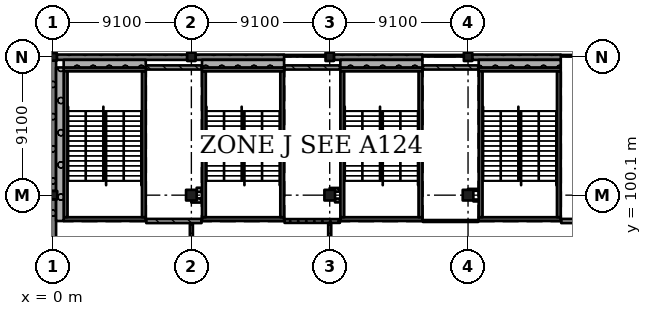
"""IFC4 building model, lengths in metres.
Left out: names, types, materials, properties, quantities, classifications, styles, units other than length and angle.
Written with IfcOpenShell. Run it as: python <this file> out.ifc"""

import sys

from ifc_helpers import new_model, si_unit, direction, frame, frame_2d, origin, origin_2d, place, context, subcontext, project, spatial, rectangle, extrude, element, fill, save


model = new_model("IFC4")
c1 = context("Model", 3, precision=1e-05, world=origin(), true_north=direction((0.0, 1.0)))
c2 = subcontext(c1, "Body", "Model", "MODEL_VIEW")
j1 = project(units=[si_unit("LENGTHUNIT", "METRE"), si_unit("PLANEANGLEUNIT", "RADIAN")], contexts=[c1])
p1 = place(None, origin())
s1 = spatial("IfcSite", under=j1, at=p1, CompositionType="ELEMENT")
p2 = place(p1, origin())
s2 = spatial("IfcBuilding", under=s1, at=p2, CompositionType="ELEMENT")
p3 = place(p2, frame((0.0, 0.0, 6.37)))
s3 = spatial("IfcBuildingStorey", under=s2, at=p3, CompositionType="ELEMENT", Elevation=6.37)
p4 = place(p3, frame((0.0, 100.1, 0.0), z_axis=(0.0, 0.0, 1.0), x_axis=(1.0, 0.0, 0.0)))
e1 = element("IfcColumn", 1, at=p4, inside=s3, PredefinedType="COLUMN", context=c2, shape_type="SweptSolid", body=[
    extrude(rectangle(XDim=0.55, YDim=0.55, at=origin_2d()), origin(), (0.0, 0.0, 1.0), 4.55),
])
p5 = place(p3, frame((0.0, 109.2, 0.0), z_axis=(0.0, 0.0, 1.0), x_axis=(1.0, 0.0, 0.0)))
e2 = element("IfcColumn", 2, at=p5, inside=s3, PredefinedType="COLUMN", context=c2, shape_type="SweptSolid", body=[
    extrude(rectangle(XDim=0.5, YDim=0.5, at=origin_2d()), origin(), (0.0, 0.0, 1.0), 4.55),
])
p6 = place(p3, frame((9.1, 100.1, 0.0), z_axis=(0.0, 0.0, 1.0), x_axis=(1.0, 0.0, 0.0)))
e3 = element("IfcColumn", 3, at=p6, inside=s3, PredefinedType="COLUMN", context=c2, shape_type="SweptSolid", body=[
    extrude(rectangle(XDim=0.7, YDim=0.7, at=origin_2d()), origin(), (0.0, 0.0, 1.0), 4.55),
])
p7 = place(p3, frame((9.1, 109.2, 0.0), z_axis=(0.0, 0.0, 1.0), x_axis=(1.0, 0.0, 0.0)))
e4 = element("IfcColumn", 4, at=p7, inside=s3, PredefinedType="COLUMN", context=c2, shape_type="SweptSolid", body=[
    extrude(rectangle(XDim=0.55, YDim=0.55, at=origin_2d()), origin(), (0.0, 0.0, 1.0), 4.55),
])
p8 = place(p3, frame((18.2, 100.1, 0.0), z_axis=(0.0, 0.0, 1.0), x_axis=(1.0, 0.0, 0.0)))
e5 = element("IfcColumn", 5, at=p8, inside=s3, PredefinedType="COLUMN", context=c2, shape_type="SweptSolid", body=[
    extrude(rectangle(XDim=0.7, YDim=0.7, at=origin_2d()), origin(), (0.0, 0.0, 1.0), 4.55),
])
p9 = place(p3, frame((18.2, 109.2, 0.0), z_axis=(0.0, 0.0, 1.0), x_axis=(1.0, 0.0, 0.0)))
e6 = element("IfcColumn", 6, at=p9, inside=s3, PredefinedType="COLUMN", context=c2, shape_type="SweptSolid", body=[
    extrude(rectangle(XDim=0.55, YDim=0.55, at=origin_2d()), origin(), (0.0, 0.0, 1.0), 4.55),
])
p10 = place(p3, frame((27.3, 100.1, 0.0), z_axis=(0.0, 0.0, 1.0), x_axis=(1.0, 0.0, 0.0)))
e7 = element("IfcColumn", 7, at=p10, inside=s3, PredefinedType="COLUMN", context=c2, shape_type="SweptSolid", body=[
    extrude(rectangle(XDim=0.7, YDim=0.7, at=origin_2d()), origin(), (0.0, 0.0, 1.0), 4.55),
])
p11 = place(p3, frame((27.3, 109.2, 0.0), z_axis=(0.0, 0.0, 1.0), x_axis=(1.0, 0.0, 0.0)))
e8 = element("IfcColumn", 8, at=p11, inside=s3, PredefinedType="COLUMN", context=c2, shape_type="SweptSolid", body=[
    extrude(rectangle(XDim=0.55, YDim=0.55, at=origin_2d()), origin(), (0.0, 0.0, 1.0), 4.55),
])
p12 = place(p3, frame((6.1, 98.525, 0.0), z_axis=(0.0, 0.0, 1.0), x_axis=(-1.0, 0.0, 0.0)))
e9 = element("IfcWall", 9, at=p12, inside=s3, PredefinedType="SHEAR", context=c2, shape_type="SweptSolid", body=[
    extrude(rectangle(XDim=5.4, YDim=0.25, at=frame_2d((2.7, 0.0))), origin(), (0.0, 0.0, 1.0), 4.55),
])
p13 = place(p12, frame((1.5, 0.0, 0.0)))
e10 = element("IfcOpeningElement", 10, at=p13, cuts=e9, PredefinedType="OPENING", context=c2, shape_type="SweptSolid", body=[
    extrude(rectangle(XDim=2.4, YDim=2.1, at=frame_2d((1.2, 1.05))), frame((0.0, 0.135, 0.0), z_axis=(0.0, -1.0, 0.0), x_axis=(1.0, 0.0, 0.0)), (0.0, 0.0, 1.0), 0.27),
])
p14 = place(p3, frame((6.1, 108.375, 0.0), z_axis=(0.0, 0.0, 1.0), x_axis=(-1.0, 0.0, 0.0)))
e11 = element("IfcWall", 11, at=p14, inside=s3, PredefinedType="SHEAR", context=c2, shape_type="SweptSolid", body=[
    extrude(rectangle(XDim=5.4, YDim=0.25, at=frame_2d((2.7, 0.0))), origin(), (0.0, 0.0, 1.0), 4.55),
])
for number, where, z_axis, x_axis in (
    (12, (0.825, 108.25, 0.0), (0.0, 0.0, 1.0), (0.0, -1.0, 0.0)),
    (13, (5.975, 108.25, 0.0), (0.0, 0.0, 1.0), (0.0, -1.0, 0.0)),
):
    element("IfcWall", number, at=place(p3, frame(where, z_axis=z_axis, x_axis=x_axis)), inside=s3, PredefinedType="SHEAR", context=c2, shape_type="SweptSolid", body=[
        extrude(rectangle(XDim=9.6, YDim=0.25, at=frame_2d((4.8, 0.0))), origin(), (0.0, 0.0, 1.0), 4.55),
    ])
p15 = place(p3, frame((15.2, 98.525, 0.0), z_axis=(0.0, 0.0, 1.0), x_axis=(-1.0, 0.0, 0.0)))
e14 = element("IfcWall", 14, at=p15, inside=s3, PredefinedType="SHEAR", context=c2, shape_type="SweptSolid", body=[
    extrude(rectangle(XDim=5.4, YDim=0.25, at=frame_2d((2.7, 0.0))), origin(), (0.0, 0.0, 1.0), 4.55),
])
p16 = place(p15, frame((1.5, 0.0, 0.0)))
e15 = element("IfcOpeningElement", 15, at=p16, cuts=e14, PredefinedType="OPENING", context=c2, shape_type="SweptSolid", body=[
    extrude(rectangle(XDim=2.4, YDim=2.1, at=frame_2d((1.2, 1.05))), frame((0.0, 0.135, 0.0), z_axis=(0.0, -1.0, 0.0), x_axis=(1.0, 0.0, 0.0)), (0.0, 0.0, 1.0), 0.27),
])
p17 = place(p3, frame((15.2, 108.375, 0.0), z_axis=(0.0, 0.0, 1.0), x_axis=(-1.0, 0.0, 0.0)))
e16 = element("IfcWall", 16, at=p17, inside=s3, PredefinedType="SHEAR", context=c2, shape_type="SweptSolid", body=[
    extrude(rectangle(XDim=5.4, YDim=0.25, at=frame_2d((2.7, 0.0))), origin(), (0.0, 0.0, 1.0), 4.55),
])
for number, where, z_axis, x_axis in (
    (17, (9.925, 108.25, 0.0), (0.0, 0.0, 1.0), (0.0, -1.0, 0.0)),
    (18, (15.075, 108.25, 0.0), (0.0, 0.0, 1.0), (0.0, -1.0, 0.0)),
):
    element("IfcWall", number, at=place(p3, frame(where, z_axis=z_axis, x_axis=x_axis)), inside=s3, PredefinedType="SHEAR", context=c2, shape_type="SweptSolid", body=[
        extrude(rectangle(XDim=9.6, YDim=0.25, at=frame_2d((4.8, 0.0))), origin(), (0.0, 0.0, 1.0), 4.55),
    ])
p18 = place(p3, frame((24.3, 98.525, 0.0), z_axis=(0.0, 0.0, 1.0), x_axis=(-1.0, 0.0, 0.0)))
e19 = element("IfcWall", 19, at=p18, inside=s3, PredefinedType="SHEAR", context=c2, shape_type="SweptSolid", body=[
    extrude(rectangle(XDim=5.4, YDim=0.25, at=frame_2d((2.7, 0.0))), origin(), (0.0, 0.0, 1.0), 4.55),
])
p19 = place(p18, frame((1.5, 0.0, 0.0)))
e20 = element("IfcOpeningElement", 20, at=p19, cuts=e19, PredefinedType="OPENING", context=c2, shape_type="SweptSolid", body=[
    extrude(rectangle(XDim=2.4, YDim=2.1, at=frame_2d((1.2, 1.05))), frame((0.0, 0.135, 0.0), z_axis=(0.0, -1.0, 0.0), x_axis=(1.0, 0.0, 0.0)), (0.0, 0.0, 1.0), 0.27),
])
p20 = place(p3, frame((24.3, 108.375, 0.0), z_axis=(0.0, 0.0, 1.0), x_axis=(-1.0, 0.0, 0.0)))
e21 = element("IfcWall", 21, at=p20, inside=s3, PredefinedType="SHEAR", context=c2, shape_type="SweptSolid", body=[
    extrude(rectangle(XDim=5.4, YDim=0.25, at=frame_2d((2.7, 0.0))), origin(), (0.0, 0.0, 1.0), 4.55),
])
for number, where, z_axis, x_axis in (
    (22, (19.025, 108.25, 0.0), (0.0, 0.0, 1.0), (0.0, -1.0, 0.0)),
    (23, (24.175, 108.25, 0.0), (0.0, 0.0, 1.0), (0.0, -1.0, 0.0)),
):
    element("IfcWall", number, at=place(p3, frame(where, z_axis=z_axis, x_axis=x_axis)), inside=s3, PredefinedType="SHEAR", context=c2, shape_type="SweptSolid", body=[
        extrude(rectangle(XDim=9.6, YDim=0.25, at=frame_2d((4.8, 0.0))), origin(), (0.0, 0.0, 1.0), 4.55),
    ])
p21 = place(p3, frame((33.4, 98.525, 0.0), z_axis=(0.0, 0.0, 1.0), x_axis=(-1.0, 0.0, 0.0)))
e24 = element("IfcWall", 24, at=p21, inside=s3, PredefinedType="SHEAR", context=c2, shape_type="SweptSolid", body=[
    extrude(rectangle(XDim=5.4, YDim=0.25, at=frame_2d((2.7, 0.0))), origin(), (0.0, 0.0, 1.0), 4.55),
])
p22 = place(p21, frame((1.5, 0.0, 0.0)))
e25 = element("IfcOpeningElement", 25, at=p22, cuts=e24, PredefinedType="OPENING", context=c2, shape_type="SweptSolid", body=[
    extrude(rectangle(XDim=2.4, YDim=2.1, at=frame_2d((1.2, 1.05))), frame((0.0, 0.135, 0.0), z_axis=(0.0, -1.0, 0.0), x_axis=(1.0, 0.0, 0.0)), (0.0, 0.0, 1.0), 0.27),
])
p23 = place(p3, frame((33.4, 108.375, 0.0), z_axis=(0.0, 0.0, 1.0), x_axis=(-1.0, 0.0, 0.0)))
e26 = element("IfcWall", 26, at=p23, inside=s3, PredefinedType="SHEAR", context=c2, shape_type="SweptSolid", body=[
    extrude(rectangle(XDim=5.4, YDim=0.25, at=frame_2d((2.7, 0.0))), origin(), (0.0, 0.0, 1.0), 4.55),
])
for number, where, z_axis, x_axis in (
    (27, (28.125, 108.25, 0.0), (0.0, 0.0, 1.0), (0.0, -1.0, 0.0)),
    (28, (33.275, 108.25, 0.0), (0.0, 0.0, 1.0), (0.0, -1.0, 0.0)),
):
    element("IfcWall", number, at=place(p3, frame(where, z_axis=z_axis, x_axis=x_axis)), inside=s3, PredefinedType="SHEAR", context=c2, shape_type="SweptSolid", body=[
        extrude(rectangle(XDim=9.6, YDim=0.25, at=frame_2d((4.8, 0.0))), origin(), (0.0, 0.0, 1.0), 4.55),
    ])
for number, where, z_axis, x_axis in (
    (29, (33.4, 109.175, 0.0), (0.0, 0.0, 1.0), (-1.0, 0.0, 0.0)),
    (30, (24.3, 109.175, 0.0), (0.0, 0.0, 1.0), (-1.0, 0.0, 0.0)),
    (31, (15.2, 109.175, 0.0), (0.0, 0.0, 1.0), (-1.0, 0.0, 0.0)),
):
    element("IfcWall", number, at=place(p3, frame(where, z_axis=z_axis, x_axis=x_axis)), inside=s3, PredefinedType="SOLIDWALL", context=c2, shape_type="SweptSolid", body=[
        extrude(rectangle(XDim=5.825, YDim=0.35, at=frame_2d((2.913, 0.0))), origin(), (0.0, 0.0, 1.0), 3.5),
    ])
for number, where, z_axis, x_axis in (
    (32, (8.825, 109.175, 0.0), (0.0, 0.0, 1.0), (-1.0, 0.0, 0.0)),
    (33, (0.025, 108.95, 0.0), (0.0, 0.0, 1.0), (0.0, -1.0, 0.0)),
):
    element("IfcWall", number, at=place(p3, frame(where, z_axis=z_axis, x_axis=x_axis)), inside=s3, PredefinedType="SOLIDWALL", context=c2, shape_type="SweptSolid", body=[
        extrude(rectangle(XDim=8.575, YDim=0.35, at=frame_2d((4.288, 0.0))), origin(), (0.0, 0.0, 1.0), 3.5),
    ])
p24 = place(p3, frame((0.025, 99.825, 0.0), z_axis=(0.0, 0.0, 1.0), x_axis=(0.0, -1.0, 0.0)))
e34 = element("IfcWall", 34, at=p24, inside=s3, PredefinedType="SOLIDWALL", context=c2, shape_type="SweptSolid", body=[
    extrude(rectangle(XDim=8.5, YDim=0.35, at=frame_2d((4.25, 0.0))), origin(), (0.0, 0.0, 1.0), 3.5),
])
p25 = place(p3, frame((0.7, 108.75, 0.0), z_axis=(0.0, 0.0, 1.0), x_axis=(1.0, 0.0, 0.0)))
e35 = element("IfcWall", 35, at=p25, inside=s3, PredefinedType="SOLIDWALL", context=c2, shape_type="SweptSolid", body=[
    extrude(rectangle(XDim=5.4, YDim=0.5, at=frame_2d((2.7, 0.0))), origin(), (0.0, 0.0, 1.0), 4.55),
])
p26 = place(p3, frame((0.45, 98.4, 0.0), z_axis=(0.0, 0.0, 1.0), x_axis=(0.0, 1.0, 0.0)))
e36 = element("IfcWall", 36, at=p26, inside=s3, PredefinedType="SOLIDWALL", context=c2, shape_type="SweptSolid", body=[
    extrude(rectangle(XDim=10.1, YDim=0.5, at=frame_2d((5.05, 0.0))), origin(), (0.0, 0.0, 1.0), 4.25),
])
p27 = place(p3, frame((9.8, 108.75, 0.0), z_axis=(0.0, 0.0, 1.0), x_axis=(1.0, 0.0, 0.0)))
e37 = element("IfcWall", 37, at=p27, inside=s3, PredefinedType="SOLIDWALL", context=c2, shape_type="SweptSolid", body=[
    extrude(rectangle(XDim=5.4, YDim=0.5, at=frame_2d((2.7, 0.0))), origin(), (0.0, 0.0, 1.0), 4.55),
])
p28 = place(p3, frame((18.9, 108.75, 0.0), z_axis=(0.0, 0.0, 1.0), x_axis=(1.0, 0.0, 0.0)))
e38 = element("IfcWall", 38, at=p28, inside=s3, PredefinedType="SOLIDWALL", context=c2, shape_type="SweptSolid", body=[
    extrude(rectangle(XDim=5.4, YDim=0.5, at=frame_2d((2.7, 0.0))), origin(), (0.0, 0.0, 1.0), 4.55),
])
p29 = place(p3, frame((28.0, 108.75, 0.0), z_axis=(0.0, 0.0, 1.0), x_axis=(1.0, 0.0, 0.0)))
e39 = element("IfcWall", 39, at=p29, inside=s3, PredefinedType="SOLIDWALL", context=c2, shape_type="SweptSolid", body=[
    extrude(rectangle(XDim=5.4, YDim=0.5, at=frame_2d((2.7, 0.0))), origin(), (0.0, 0.0, 1.0), 4.55),
])
p30 = place(p3, frame((6.13, 98.4, 0.0), z_axis=(0.0, 0.0, 1.0), x_axis=(1.0, 0.0, 0.0)))
e40 = element("IfcWall", 40, at=p30, inside=s3, PredefinedType="SOLIDWALL", context=c2, shape_type="SweptSolid", body=[
    extrude(rectangle(XDim=3.64, YDim=0.275, at=frame_2d((1.82, 0.0))), origin(), (0.0, 0.0, 1.0), 4.25),
])
p31 = place(p30, frame((0.85, 0.0, 0.0)))
e41 = element("IfcOpeningElement", 41, at=p31, cuts=e40, PredefinedType="OPENING", context=c2, shape_type="SweptSolid", body=[
    extrude(rectangle(XDim=1.2, YDim=2.4, at=frame_2d((0.6, 1.2))), frame((0.0, 0.147, 0.0), z_axis=(0.0, -1.0, 0.0), x_axis=(1.0, 0.0, 0.0)), (0.0, 0.0, 1.0), 0.295),
])
p32 = place(p3, frame((6.13, 108.5, 0.0), z_axis=(0.0, 0.0, 1.0), x_axis=(1.0, 0.0, 0.0)))
e42 = element("IfcWall", 42, at=p32, inside=s3, PredefinedType="SOLIDWALL", context=c2, shape_type="SweptSolid", body=[
    extrude(rectangle(XDim=3.64, YDim=0.275, at=frame_2d((1.82, 0.0))), origin(), (0.0, 0.0, 1.0), 4.25),
])
p33 = place(p3, frame((9.1, 98.262, 0.0), z_axis=(0.0, 0.0, 1.0), x_axis=(0.0, -1.0, 0.0)))
e43 = element("IfcWall", 43, at=p33, inside=s3, PredefinedType="PARTITIONING", context=c2, shape_type="SweptSolid", body=[
    extrude(rectangle(XDim=6.863, YDim=0.2, at=frame_2d((3.431, 0.0))), origin(), (0.0, 0.0, 1.0), 3.55),
])
p34 = place(p33, frame((0.85, 0.0, 0.0)))
e44 = element("IfcOpeningElement", 44, at=p34, cuts=e43, PredefinedType="OPENING", context=c2, shape_type="SweptSolid", body=[
    extrude(rectangle(XDim=1.8, YDim=2.4, at=frame_2d((0.9, 1.2))), frame((0.0, 0.11, 0.0), z_axis=(0.0, -1.0, 0.0), x_axis=(1.0, 0.0, 0.0)), (0.0, 0.0, 1.0), 0.22),
])
p35 = place(p33, frame((4.25, 0.0, 0.0)))
e45 = element("IfcOpeningElement", 45, at=p35, cuts=e43, PredefinedType="OPENING", context=c2, shape_type="SweptSolid", body=[
    extrude(rectangle(XDim=1.8, YDim=2.4, at=frame_2d((0.9, 1.2))), frame((0.0, 0.11, 0.0), z_axis=(0.0, -1.0, 0.0), x_axis=(1.0, 0.0, 0.0)), (0.0, 0.0, 1.0), 0.22),
])
p36 = place(p3, frame((9.1, 99.75, 0.0), z_axis=(0.0, 0.0, 1.0), x_axis=(1.0, 0.0, 0.0)))
e46 = element("IfcWall", 46, at=p36, inside=s3, PredefinedType="SOLIDWALL", context=c2, shape_type="SweptSolid", body=[
    extrude(rectangle(XDim=0.67, YDim=0.275, at=frame_2d((0.335, 0.0))), origin(), (0.0, 0.0, 1.0), 4.25),
])
p37 = place(p3, frame((9.77, 100.45, 0.0), z_axis=(0.0, 0.0, 1.0), x_axis=(-1.0, 0.0, 0.0)))
e47 = element("IfcWall", 47, at=p37, inside=s3, PredefinedType="SOLIDWALL", context=c2, shape_type="SweptSolid", body=[
    extrude(rectangle(XDim=0.32, YDim=0.275, at=frame_2d((0.16, 0.0))), origin(), (0.0, 0.0, 1.0), 4.25),
])
p38 = place(p3, frame((15.23, 98.4, 0.0), z_axis=(0.0, 0.0, 1.0), x_axis=(1.0, 0.0, 0.0)))
e48 = element("IfcWall", 48, at=p38, inside=s3, PredefinedType="SOLIDWALL", context=c2, shape_type="SweptSolid", body=[
    extrude(rectangle(XDim=3.64, YDim=0.25, at=frame_2d((1.82, 0.0))), origin(), (0.0, 0.0, 1.0), 4.25),
])
p39 = place(p38, frame((0.95, 0.0, 0.0)))
e49 = element("IfcOpeningElement", 49, at=p39, cuts=e48, PredefinedType="OPENING", context=c2, shape_type="SweptSolid", body=[
    extrude(rectangle(XDim=1.0, YDim=2.1, at=frame_2d((0.5, 1.05))), frame((0.0, 0.135, 0.0), z_axis=(0.0, -1.0, 0.0), x_axis=(1.0, 0.0, 0.0)), (0.0, 0.0, 1.0), 0.27),
])
p40 = place(p3, frame((15.23, 108.5, 0.0), z_axis=(0.0, 0.0, 1.0), x_axis=(1.0, 0.0, 0.0)))
e50 = element("IfcWall", 50, at=p40, inside=s3, PredefinedType="SOLIDWALL", context=c2, shape_type="SweptSolid", body=[
    extrude(rectangle(XDim=3.64, YDim=0.275, at=frame_2d((1.82, 0.0))), origin(), (0.0, 0.0, 1.0), 4.25),
])
p41 = place(p3, frame((18.2, 98.275, 0.0), z_axis=(0.0, 0.0, 1.0), x_axis=(0.0, -1.0, 0.0)))
e51 = element("IfcWall", 51, at=p41, inside=s3, PredefinedType="PARTITIONING", context=c2, shape_type="SweptSolid", body=[
    extrude(rectangle(XDim=6.85, YDim=0.2, at=frame_2d((3.425, 0.0))), origin(), (0.0, 0.0, 1.0), 3.55),
])
p42 = place(p41, frame((0.85, 0.0, 0.0)))
e52 = element("IfcOpeningElement", 52, at=p42, cuts=e51, PredefinedType="OPENING", context=c2, shape_type="SweptSolid", body=[
    extrude(rectangle(XDim=1.8, YDim=2.4, at=frame_2d((0.9, 1.2))), frame((0.0, 0.11, 0.0), z_axis=(0.0, -1.0, 0.0), x_axis=(1.0, 0.0, 0.0)), (0.0, 0.0, 1.0), 0.22),
])
p43 = place(p41, frame((4.25, 0.0, 0.0)))
e53 = element("IfcOpeningElement", 53, at=p43, cuts=e51, PredefinedType="OPENING", context=c2, shape_type="SweptSolid", body=[
    extrude(rectangle(XDim=1.8, YDim=2.4, at=frame_2d((0.9, 1.2))), frame((0.0, 0.11, 0.0), z_axis=(0.0, -1.0, 0.0), x_axis=(1.0, 0.0, 0.0)), (0.0, 0.0, 1.0), 0.22),
])
p44 = place(p3, frame((18.2, 100.45, 0.0), z_axis=(0.0, 0.0, 1.0), x_axis=(1.0, 0.0, 0.0)))
e54 = element("IfcWall", 54, at=p44, inside=s3, PredefinedType="SOLIDWALL", context=c2, shape_type="SweptSolid", body=[
    extrude(rectangle(XDim=0.67, YDim=0.25, at=frame_2d((0.335, 0.0))), origin(), (0.0, 0.0, 1.0), 4.25),
])
p45 = place(p3, frame((18.55, 99.75, 0.0), z_axis=(0.0, 0.0, 1.0), x_axis=(1.0, 0.0, 0.0)))
e55 = element("IfcWall", 55, at=p45, inside=s3, PredefinedType="SOLIDWALL", context=c2, shape_type="SweptSolid", body=[
    extrude(rectangle(XDim=0.32, YDim=0.25, at=frame_2d((0.16, 0.0))), origin(), (0.0, 0.0, 1.0), 4.25),
])
p46 = place(p3, frame((24.33, 98.4, 0.0), z_axis=(0.0, 0.0, 1.0), x_axis=(1.0, 0.0, 0.0)))
e56 = element("IfcWall", 56, at=p46, inside=s3, PredefinedType="PARTITIONING", context=c2, shape_type="SweptSolid", body=[
    extrude(rectangle(XDim=3.64, YDim=0.125, at=frame_2d((1.82, 0.0))), origin(), (0.0, 0.0, 1.0), 4.25),
])
p47 = place(p46, frame((1.35, 0.0, 0.0)))
e57 = element("IfcOpeningElement", 57, at=p47, cuts=e56, PredefinedType="OPENING", context=c2, shape_type="SweptSolid", body=[
    extrude(rectangle(XDim=0.9, YDim=2.1, at=frame_2d((0.45, 1.05))), frame((0.0, 0.073, 0.0), z_axis=(0.0, -1.0, 0.0), x_axis=(1.0, 0.0, 0.0)), (0.0, 0.0, 1.0), 0.145),
])
p48 = place(p3, frame((24.33, 108.5, 0.0), z_axis=(0.0, 0.0, 1.0), x_axis=(1.0, 0.0, 0.0)))
e58 = element("IfcWall", 58, at=p48, inside=s3, PredefinedType="SOLIDWALL", context=c2, shape_type="SweptSolid", body=[
    extrude(rectangle(XDim=3.64, YDim=0.275, at=frame_2d((1.82, 0.0))), origin(), (0.0, 0.0, 1.0), 4.25),
])
p49 = place(p3, frame((27.3, 100.45, 0.0), z_axis=(0.0, 0.0, 1.0), x_axis=(1.0, 0.0, 0.0)))
e59 = element("IfcWall", 59, at=p49, inside=s3, PredefinedType="PARTITIONING", context=c2, shape_type="SweptSolid", body=[
    extrude(rectangle(XDim=0.67, YDim=0.125, at=frame_2d((0.335, 0.0))), origin(), (0.0, 0.0, 1.0), 4.25),
])
p50 = place(p3, frame((27.65, 99.75, 0.0), z_axis=(0.0, 0.0, 1.0), x_axis=(1.0, 0.0, 0.0)))
e60 = element("IfcWall", 60, at=p50, inside=s3, PredefinedType="PARTITIONING", context=c2, shape_type="SweptSolid", body=[
    extrude(rectangle(XDim=0.32, YDim=0.125, at=frame_2d((0.16, 0.0))), origin(), (0.0, 0.0, 1.0), 4.25),
])
p51 = place(p3, frame((33.43, 98.4, 0.0), z_axis=(0.0, 0.0, 1.0), x_axis=(1.0, 0.0, 0.0)))
e61 = element("IfcWall", 61, at=p51, inside=s3, PredefinedType="SOLIDWALL", context=c2, shape_type="SweptSolid", body=[
    extrude(rectangle(XDim=2.683, YDim=0.275, at=frame_2d((1.341, 0.0))), origin(), (0.0, 0.0, 1.0), 4.25),
])
p52 = place(p31, origin())
e62 = element("IfcDoor", 62, at=p52, inside=s3, OperationType="SINGLE_SWING_RIGHT", PredefinedType="DOOR", context=c2, shape_type="SweptSolid", body=[
    extrude(rectangle(XDim=1.2, YDim=2.4, at=frame_2d((0.6, 1.2))), frame((0.0, 0.025, 0.0), z_axis=(0.0, -1.0, 0.0), x_axis=(1.0, 0.0, 0.0)), (0.0, 0.0, 1.0), 0.05),
])
fill(e41, e62)
p53 = place(p39, origin())
e63 = element("IfcDoor", 63, at=p53, inside=s3, OperationType="SINGLE_SWING_RIGHT", PredefinedType="DOOR", context=c2, shape_type="SweptSolid", body=[
    extrude(rectangle(XDim=1.0, YDim=2.1, at=frame_2d((0.5, 1.05))), frame((0.0, 0.025, 0.0), z_axis=(0.0, -1.0, 0.0), x_axis=(1.0, 0.0, 0.0)), (0.0, 0.0, 1.0), 0.05),
])
fill(e49, e63)
p54 = place(p47, origin())
e64 = element("IfcDoor", 64, at=p54, inside=s3, OperationType="SINGLE_SWING_RIGHT", PredefinedType="DOOR", context=c2, shape_type="SweptSolid", body=[
    extrude(rectangle(XDim=0.9, YDim=2.1, at=frame_2d((0.45, 1.05))), frame((0.0, 0.025, 0.0), z_axis=(0.0, -1.0, 0.0), x_axis=(1.0, 0.0, 0.0)), (0.0, 0.0, 1.0), 0.05),
])
fill(e57, e64)
p55 = place(p34, origin())
e65 = element("IfcDoor", 65, at=p55, inside=s3, OperationType="DOUBLE_DOOR_SINGLE_SWING", PredefinedType="DOOR", context=c2, shape_type="SweptSolid", body=[
    extrude(rectangle(XDim=1.8, YDim=2.4, at=frame_2d((0.9, 1.2))), frame((0.0, 0.025, 0.0), z_axis=(0.0, -1.0, 0.0), x_axis=(1.0, 0.0, 0.0)), (0.0, 0.0, 1.0), 0.05),
])
fill(e44, e65)
p56 = place(p42, origin())
e66 = element("IfcDoor", 66, at=p56, inside=s3, OperationType="DOUBLE_DOOR_SINGLE_SWING", PredefinedType="DOOR", context=c2, shape_type="SweptSolid", body=[
    extrude(rectangle(XDim=1.8, YDim=2.4, at=frame_2d((0.9, 1.2))), frame((0.0, 0.025, 0.0), z_axis=(0.0, -1.0, 0.0), x_axis=(1.0, 0.0, 0.0)), (0.0, 0.0, 1.0), 0.05),
])
fill(e52, e66)
p57 = place(p13, origin())
e67 = element("IfcDoor", 67, at=p57, inside=s3, OperationType="DOUBLE_DOOR_SINGLE_SWING", PredefinedType="DOOR", context=c2, shape_type="SweptSolid", body=[
    extrude(rectangle(XDim=2.4, YDim=2.1, at=frame_2d((1.2, 1.05))), frame((0.0, 0.025, 0.0), z_axis=(0.0, -1.0, 0.0), x_axis=(1.0, 0.0, 0.0)), (0.0, 0.0, 1.0), 0.05),
])
fill(e10, e67)
p58 = place(p16, origin())
e68 = element("IfcDoor", 68, at=p58, inside=s3, OperationType="DOUBLE_DOOR_SINGLE_SWING", PredefinedType="DOOR", context=c2, shape_type="SweptSolid", body=[
    extrude(rectangle(XDim=2.4, YDim=2.1, at=frame_2d((1.2, 1.05))), frame((0.0, 0.025, 0.0), z_axis=(0.0, -1.0, 0.0), x_axis=(1.0, 0.0, 0.0)), (0.0, 0.0, 1.0), 0.05),
])
fill(e15, e68)
p59 = place(p19, origin())
e69 = element("IfcDoor", 69, at=p59, inside=s3, OperationType="DOUBLE_DOOR_SINGLE_SWING", PredefinedType="DOOR", context=c2, shape_type="SweptSolid", body=[
    extrude(rectangle(XDim=2.4, YDim=2.1, at=frame_2d((1.2, 1.05))), frame((0.0, 0.025, 0.0), z_axis=(0.0, -1.0, 0.0), x_axis=(1.0, 0.0, 0.0)), (0.0, 0.0, 1.0), 0.05),
])
fill(e20, e69)
p60 = place(p22, origin())
e70 = element("IfcDoor", 70, at=p60, inside=s3, OperationType="DOUBLE_DOOR_SINGLE_SWING", PredefinedType="DOOR", context=c2, shape_type="SweptSolid", body=[
    extrude(rectangle(XDim=2.4, YDim=2.1, at=frame_2d((1.2, 1.05))), frame((0.0, 0.025, 0.0), z_axis=(0.0, -1.0, 0.0), x_axis=(1.0, 0.0, 0.0)), (0.0, 0.0, 1.0), 0.05),
])
fill(e25, e70)
save(model, sys.argv[1])
